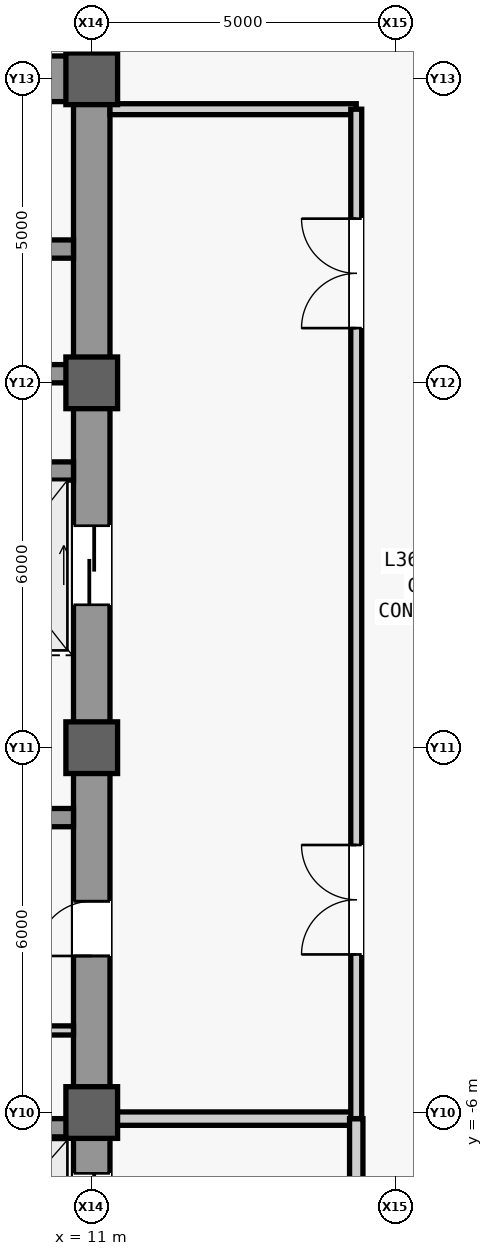
"""IFC4 building model, lengths in metres.
Left out: names, types, materials, properties, quantities, classifications, styles, units other than length and angle.
Written with IfcOpenShell. Run it as: python <this file> out.ifc"""

import sys

from ifc_helpers import new_model, si_unit, direction, frame, frame_2d, origin, origin_2d, place, context, subcontext, project, spatial, rectangle, extrude, source, transform, mapped, element, fill, save


model = new_model("IFC4")
c1 = context("Model", 3, precision=1e-05, world=origin(), true_north=direction((0.0, 1.0)))
c2 = subcontext(c1, "Body", "Model", "MODEL_VIEW")
j1 = project(units=[si_unit("LENGTHUNIT", "METRE"), si_unit("PLANEANGLEUNIT", "RADIAN")], contexts=[c1])
p1 = place(None, origin())
s1 = spatial("IfcSite", under=j1, at=p1, CompositionType="ELEMENT")
p2 = place(p1, origin())
s2 = spatial("IfcBuilding", under=s1, at=p2, CompositionType="ELEMENT")
p3 = place(p2, frame((0.0, 0.0, 159.1)))
s3 = spatial("IfcBuildingStorey", under=s2, at=p3, CompositionType="ELEMENT", Elevation=159.1)
m1 = source(origin(), c2, "Body", "SweptSolid", [
    extrude(rectangle(XDim=22.0, YDim=0.6, at=frame_2d((11.0, 0.0))), origin(), (0.0, 0.0, 1.0), 3.78),
])
p4 = place(p3, frame((11.0, -11.0, 0.0), z_axis=(0.0, 0.0, 1.0), x_axis=(0.0, 1.0, 0.0)))
e1 = element("IfcWall", 1, at=p4, inside=s3, PredefinedType="SHEAR", context=c2, shape_type="MappedRepresentation", body=[
    mapped(m1, transform((0.0, 0.0, 0.0), scale=1.0)),
])
m2 = source(origin(), c2, "Body", "SweptSolid", [
    extrude(rectangle(XDim=1.1, YDim=2.2, at=frame_2d((0.55, 1.1))), frame((0.0, 0.31, 0.0), z_axis=(0.0, -1.0, 0.0), x_axis=(1.0, 0.0, 0.0)), (0.0, 0.0, 1.0), 0.62),
])
p5 = place(p4, frame((0.8, 0.0, 0.0)))
e2 = element("IfcOpeningElement", 2, at=p5, cuts=e1, PredefinedType="OPENING", context=c2, shape_type="MappedRepresentation", body=[
    mapped(m2, transform((0.0, 0.0, 0.0), scale=1.0)),
])
m3 = source(origin(), c2, "Body", "SweptSolid", [
    extrude(rectangle(XDim=0.9, YDim=2.15, at=frame_2d((0.45, 1.075))), frame((0.0, 0.31, 0.0), z_axis=(0.0, -1.0, 0.0), x_axis=(1.0, 0.0, 0.0)), (0.0, 0.0, 1.0), 0.62),
])
p6 = place(p4, frame((7.575, 0.0, 0.0)))
e3 = element("IfcOpeningElement", 3, at=p6, cuts=e1, PredefinedType="OPENING", context=c2, shape_type="MappedRepresentation", body=[
    mapped(m3, transform((0.0, 0.0, 0.0), scale=1.0)),
])
m4 = source(origin(), c2, "Body", "SweptSolid", [
    extrude(rectangle(XDim=1.3, YDim=2.3, at=frame_2d((0.65, 1.15))), frame((0.0, 0.31, 0.0), z_axis=(0.0, -1.0, 0.0), x_axis=(1.0, 0.0, 0.0)), (0.0, 0.0, 1.0), 0.62),
])
p7 = place(p4, frame((2.7, 0.0, 0.0)))
e4 = element("IfcOpeningElement", 4, at=p7, cuts=e1, PredefinedType="OPENING", context=c2, shape_type="MappedRepresentation", body=[
    mapped(m4, transform((0.0, 0.0, 0.0), scale=1.0)),
])
p8 = place(p4, frame((13.35, 0.0, 0.0)))
e5 = element("IfcOpeningElement", 5, at=p8, cuts=e1, PredefinedType="OPENING", context=c2, shape_type="MappedRepresentation", body=[
    mapped(m4, transform((0.0, 0.0, 0.0), scale=1.0)),
])
m5 = source(origin(), c2, "Body", "SweptSolid", [
    extrude(rectangle(XDim=5.85, YDim=0.75, at=frame_2d((2.925, 0.0))), origin(), (0.0, 0.0, 1.0), 3.78),
])
p9 = place(p3, frame((4.85, 11.0, 0.0), z_axis=(0.0, 0.0, 1.0), x_axis=(1.0, 0.0, 0.0)))
e6 = element("IfcWall", 6, at=p9, inside=s3, PredefinedType="SHEAR", context=c2, shape_type="MappedRepresentation", body=[
    mapped(m5, transform((0.0, 0.0, 0.0), scale=1.0)),
])
m6 = source(origin(), c2, "Body", "SweptSolid", [
    extrude(rectangle(XDim=0.9, YDim=2.15, at=frame_2d((0.45, 1.075))), frame((0.0, 0.385, 0.0), z_axis=(0.0, -1.0, 0.0), x_axis=(1.0, 0.0, 0.0)), (0.0, 0.0, 1.0), 0.77),
])
p10 = place(p9, frame((0.5, 0.0, 0.0)))
e7 = element("IfcOpeningElement", 7, at=p10, cuts=e6, PredefinedType="OPENING", context=c2, shape_type="MappedRepresentation", body=[
    mapped(m6, transform((0.0, 0.0, 0.0), scale=1.0)),
])
m7 = source(origin(), c2, "Body", "SweptSolid", [
    extrude(rectangle(XDim=5.6, YDim=0.3, at=frame_2d((2.8, 0.0))), origin(), (0.0, 0.0, 1.0), 3.78),
])
p11 = place(p3, frame((5.1, -1.15, 0.0), z_axis=(0.0, 0.0, 1.0), x_axis=(1.0, 0.0, 0.0)))
e8 = element("IfcWall", 8, at=p11, inside=s3, PredefinedType="SHEAR", context=c2, shape_type="MappedRepresentation", body=[
    mapped(m7, transform((0.0, 0.0, 0.0), scale=1.0)),
])
m8 = source(origin(), c2, "Body", "SweptSolid", [
    extrude(rectangle(XDim=0.85, YDim=0.85, at=origin_2d()), origin(), (0.0, 0.0, 1.0), 4.0),
])
for number, where, z_axis, x_axis in (
    (9, (11.0, -6.0, 0.0), (0.0, 0.0, 1.0), (1.0, 0.0, 0.0)),
    (10, (11.0, 0.0, 0.0), (0.0, 0.0, 1.0), (1.0, 0.0, 0.0)),
    (11, (11.0, 6.0, 0.0), (0.0, 0.0, 1.0), (1.0, 0.0, 0.0)),
    (12, (11.0, 11.0, 0.0), (0.0, 0.0, 1.0), (1.0, 0.0, 0.0)),
):
    element("IfcColumn", number, at=place(p3, frame(where, z_axis=z_axis, x_axis=x_axis)), inside=s3, PredefinedType="COLUMN", context=c2, shape_type="MappedRepresentation", body=[
        mapped(m8, transform((0.0, 0.0, 0.0), scale=1.0)),
    ])
m9 = source(origin(), c2, "Body", "SweptSolid", [
    extrude(rectangle(XDim=2.2, YDim=0.3, at=frame_2d((1.1, 0.0))), origin(), (0.0, 0.0, 1.0), 3.78),
])
p12 = place(p3, frame((8.5, -6.25, 0.0), z_axis=(0.0, 0.0, 1.0), x_axis=(1.0, 0.0, 0.0)))
e13 = element("IfcWall", 13, at=p12, inside=s3, PredefinedType="SHEAR", context=c2, shape_type="MappedRepresentation", body=[
    mapped(m9, transform((0.0, 0.0, 0.0), scale=1.0)),
])
m10 = source(origin(), c2, "Body", "SweptSolid", [
    extrude(rectangle(XDim=2.3, YDim=0.3, at=frame_2d((1.15, 0.0))), origin(), (0.0, 0.0, 1.0), 3.78),
])
for number, where, z_axis, x_axis in (
    (14, (8.4, 4.55, 0.0), (0.0, 0.0, 1.0), (1.0, 0.0, 0.0)),
    (15, (8.4, 6.15, 0.0), (0.0, 0.0, 1.0), (1.0, 0.0, 0.0)),
    (16, (8.4, 8.2, 0.0), (0.0, 0.0, 1.0), (1.0, 0.0, 0.0)),
):
    element("IfcWall", number, at=place(p3, frame(where, z_axis=z_axis, x_axis=x_axis)), inside=s3, PredefinedType="SHEAR", context=c2, shape_type="MappedRepresentation", body=[
        mapped(m10, transform((0.0, 0.0, 0.0), scale=1.0)),
    ])
m11 = source(origin(), c2, "Body", "SweptSolid", [
    extrude(rectangle(XDim=2.05, YDim=0.15, at=frame_2d((1.025, 0.0))), origin(), (0.0, 0.0, 1.0), 3.78),
])
p13 = place(p3, frame((8.65, -4.65, 0.0), z_axis=(0.0, 0.0, 1.0), x_axis=(1.0, 0.0, 0.0)))
e17 = element("IfcWall", 17, at=p13, inside=s3, PredefinedType="PARTITIONING", context=c2, shape_type="MappedRepresentation", body=[
    mapped(m11, transform((0.0, 0.0, 0.0), scale=1.0)),
])
m12 = source(origin(), c2, "Body", "SweptSolid", [
    extrude(rectangle(XDim=4.05, YDim=0.22, at=frame_2d((2.025, 0.0))), origin(), (0.0, 0.0, 1.0), 3.007),
])
p14 = place(p3, frame((11.3, -6.1, 0.0), z_axis=(0.0, 0.0, 1.0), x_axis=(1.0, 0.0, 0.0)))
e18 = element("IfcWall", 18, at=p14, inside=s3, PredefinedType="PARTITIONING", context=c2, shape_type="MappedRepresentation", body=[
    mapped(m12, transform((0.0, 0.0, 0.0), scale=1.0)),
])
m13 = source(origin(), c2, "Body", "SweptSolid", [
    extrude(rectangle(XDim=4.4, YDim=0.22, at=frame_2d((2.2, 0.0))), origin(), (0.0, 0.0, 1.0), 3.78),
])
p15 = place(p3, frame((15.35, -10.5, 0.0), z_axis=(0.0, 0.0, 1.0), x_axis=(0.0, 1.0, 0.0)))
e19 = element("IfcWall", 19, at=p15, inside=s3, PredefinedType="PARTITIONING", context=c2, shape_type="MappedRepresentation", body=[
    mapped(m13, transform((0.0, 0.0, 0.0), scale=1.0)),
])
m14 = source(origin(), c2, "Body", "SweptSolid", [
    extrude(rectangle(XDim=1.2, YDim=2.2, at=frame_2d((0.6, 1.1))), frame((0.0, 0.12, 0.0), z_axis=(0.0, -1.0, 0.0), x_axis=(1.0, 0.0, 0.0)), (0.0, 0.0, 1.0), 0.24),
])
p16 = place(p15, frame((1.6, 0.0, 0.0)))
e20 = element("IfcOpeningElement", 20, at=p16, cuts=e19, PredefinedType="OPENING", context=c2, shape_type="MappedRepresentation", body=[
    mapped(m14, transform((0.0, 0.0, 0.0), scale=1.0)),
])
m15 = source(origin(), c2, "Body", "SweptSolid", [
    extrude(rectangle(XDim=4.05, YDim=0.18, at=frame_2d((2.025, 0.0))), origin(), (0.0, 0.0, 1.0), 3.78),
])
p17 = place(p3, frame((11.3, 10.5, 0.0), z_axis=(0.0, 0.0, 1.0), x_axis=(1.0, 0.0, 0.0)))
e21 = element("IfcWall", 21, at=p17, inside=s3, PredefinedType="PARTITIONING", context=c2, shape_type="MappedRepresentation", body=[
    mapped(m15, transform((0.0, 0.0, 0.0), scale=1.0)),
])
m16 = source(origin(), c2, "Body", "SweptSolid", [
    extrude(rectangle(XDim=16.6, YDim=0.18, at=frame_2d((8.3, 0.0))), origin(), (0.0, 0.0, 1.0), 3.78),
])
p18 = place(p3, frame((15.35, -6.1, 0.0), z_axis=(0.0, 0.0, 1.0), x_axis=(0.0, 1.0, 0.0)))
e22 = element("IfcWall", 22, at=p18, inside=s3, PredefinedType="PARTITIONING", context=c2, shape_type="MappedRepresentation", body=[
    mapped(m16, transform((0.0, 0.0, 0.0), scale=1.0)),
])
m17 = source(origin(), c2, "Body", "SweptSolid", [
    extrude(rectangle(XDim=1.8, YDim=2.25, at=frame_2d((0.9, 1.125))), frame((0.0, 0.1, 0.0), z_axis=(0.0, -1.0, 0.0), x_axis=(1.0, 0.0, 0.0)), (0.0, 0.0, 1.0), 0.2),
])
p19 = place(p18, frame((2.7, 0.0, 0.0)))
e23 = element("IfcOpeningElement", 23, at=p19, cuts=e22, PredefinedType="OPENING", context=c2, shape_type="MappedRepresentation", body=[
    mapped(m17, transform((0.0, 0.0, 0.0), scale=1.0)),
])
p20 = place(p18, frame((13.0, 0.0, 0.0)))
e24 = element("IfcOpeningElement", 24, at=p20, cuts=e22, PredefinedType="OPENING", context=c2, shape_type="MappedRepresentation", body=[
    mapped(m17, transform((0.0, 0.0, 0.0), scale=1.0)),
])
m18 = source(origin(), c2, "Body", "SweptSolid", [
    extrude(rectangle(XDim=0.9, YDim=2.15, at=frame_2d((0.45, 1.075))), frame((0.0, 0.025, 0.0), z_axis=(0.0, -1.0, 0.0), x_axis=(1.0, 0.0, 0.0)), (0.0, 0.0, 1.0), 0.05),
])
p21 = place(p6, origin())
e25 = element("IfcDoor", 25, at=p21, inside=s3, OperationType="SINGLE_SWING_LEFT", PredefinedType="DOOR", context=c2, shape_type="MappedRepresentation", body=[
    mapped(m18, transform((0.0, 0.0, 0.0), scale=1.0)),
])
fill(e3, e25)
m19 = source(origin(), c2, "Body", "SweptSolid", [
    extrude(rectangle(XDim=1.8, YDim=2.25, at=frame_2d((0.9, 1.125))), frame((0.0, 0.025, 0.0), z_axis=(0.0, -1.0, 0.0), x_axis=(1.0, 0.0, 0.0)), (0.0, 0.0, 1.0), 0.05),
])
p22 = place(p19, origin())
e26 = element("IfcDoor", 26, at=p22, inside=s3, OperationType="SINGLE_SWING_RIGHT", PredefinedType="DOOR", context=c2, shape_type="MappedRepresentation", body=[
    mapped(m19, transform((0.0, 0.0, 0.0), scale=1.0)),
])
fill(e23, e26)
p23 = place(p20, origin())
e27 = element("IfcDoor", 27, at=p23, inside=s3, OperationType="SINGLE_SWING_LEFT", PredefinedType="DOOR", context=c2, shape_type="MappedRepresentation", body=[
    mapped(m19, transform((0.0, 0.0, 0.0), scale=1.0)),
])
fill(e24, e27)
m20 = source(origin(), c2, "Body", "SweptSolid", [
    extrude(rectangle(XDim=1.3, YDim=2.3, at=frame_2d((0.65, 1.15))), frame((0.0, 0.025, 0.0), z_axis=(0.0, -1.0, 0.0), x_axis=(1.0, 0.0, 0.0)), (0.0, 0.0, 1.0), 0.05),
])
p24 = place(p7, origin())
e28 = element("IfcDoor", 28, at=p24, inside=s3, OperationType="SLIDING_TO_LEFT", PredefinedType="DOOR", context=c2, shape_type="MappedRepresentation", body=[
    mapped(m20, transform((0.0, 0.0, 0.0), scale=1.0)),
])
fill(e4, e28)
p25 = place(p8, origin())
e29 = element("IfcDoor", 29, at=p25, inside=s3, OperationType="SLIDING_TO_LEFT", PredefinedType="DOOR", context=c2, shape_type="MappedRepresentation", body=[
    mapped(m20, transform((0.0, 0.0, 0.0), scale=1.0)),
])
fill(e5, e29)
save(model, sys.argv[1])
